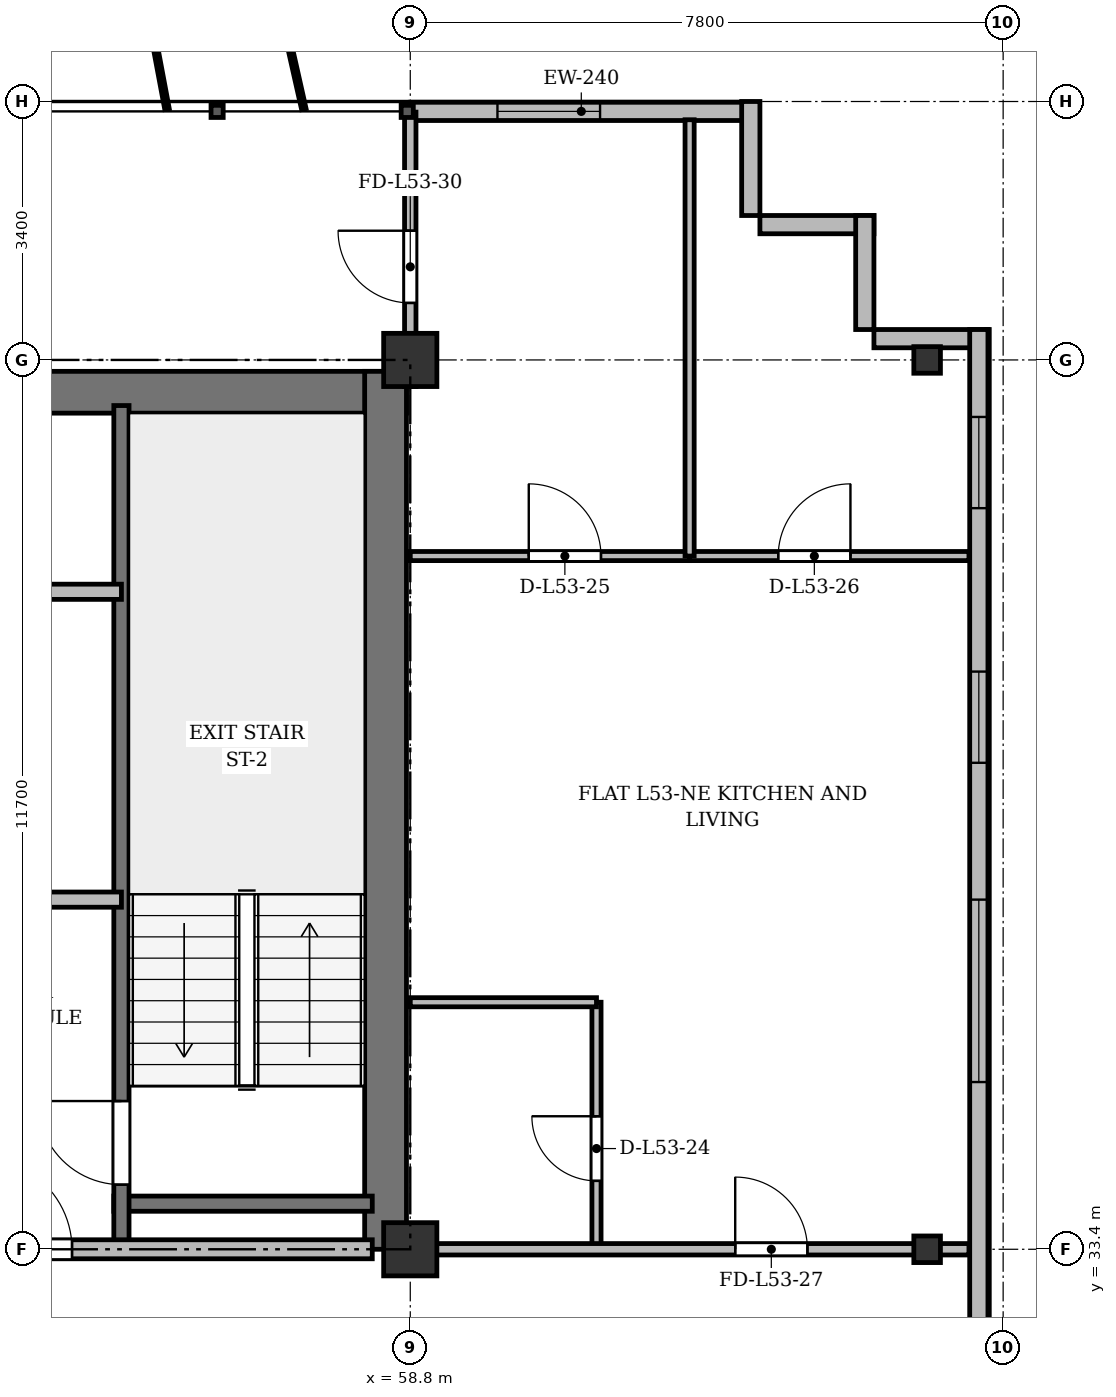
"""IFC4 building model, lengths in metres.
Left out: names, types, materials, properties, quantities, classifications, styles, units other than length and angle.
Written with IfcOpenShell. Run it as: python <this file> out.ifc"""

import sys

from ifc_helpers import new_model, si_unit, direction, frame, frame_2d, origin, origin_2d, place, context, subcontext, project, spatial, rectangle, i_section, extrude, source, transform, mapped, element, fill, save


model = new_model("IFC4")
c1 = context("Model", 3, precision=1e-05, world=origin(), true_north=direction((0.0, 1.0)))
c2 = subcontext(c1, "Body", "Model", "MODEL_VIEW")
j1 = project(units=[si_unit("LENGTHUNIT", "METRE"), si_unit("PLANEANGLEUNIT", "RADIAN")], contexts=[c1])
p1 = place(None, origin())
s1 = spatial("IfcSite", under=j1, at=p1, CompositionType="ELEMENT")
p2 = place(p1, origin())
s2 = spatial("IfcBuilding", under=s1, at=p2, CompositionType="ELEMENT")
p3 = place(p2, frame((0.0, 0.0, 204.9)))
s3 = spatial("IfcBuildingStorey", under=s2, at=p3, CompositionType="ELEMENT", Elevation=204.9)
m1 = source(origin(), c2, "Body", "SweptSolid", [
    extrude(rectangle(XDim=0.7, YDim=0.7, at=origin_2d()), origin(), (0.0, 0.0, 1.0), 3.6),
])
for number, where, z_axis, x_axis in (
    (1, (58.8, 33.4, 0.0), (0.0, 0.0, 1.0), (1.0, 0.0, 0.0)),
    (2, (58.8, 45.1, 0.0), (0.0, 0.0, 1.0), (1.0, 0.0, 0.0)),
):
    element("IfcColumn", number, at=place(p3, frame(where, z_axis=z_axis, x_axis=x_axis)), inside=s3, PredefinedType="COLUMN", context=c2, shape_type="MappedRepresentation", body=[
        mapped(m1, transform((0.0, 0.0, 0.0), x_axis=(1.0, 0.0, 0.0), y_axis=(0.0, 1.0, 0.0), z_axis=(0.0, 0.0, 1.0), scale=1.0)),
    ])
m2 = source(origin(), c2, "Body", "SweptSolid", [
    extrude(i_section(OverallWidth=0.35, OverallDepth=0.35, WebThickness=0.018, FlangeThickness=0.028, at=origin_2d()), origin(), (0.0, 0.0, 1.0), 3.6),
])
for number, where, z_axis, x_axis in (
    (3, (65.6, 33.4, 0.0), (0.0, 0.0, 1.0), (1.0, 0.0, 0.0)),
    (4, (65.6, 45.1, 0.0), (0.0, 0.0, 1.0), (1.0, 0.0, 0.0)),
):
    element("IfcColumn", number, at=place(p3, frame(where, z_axis=z_axis, x_axis=x_axis)), inside=s3, PredefinedType="COLUMN", context=c2, shape_type="MappedRepresentation", body=[
        mapped(m2, transform((0.0, 0.0, 0.0), x_axis=(1.0, 0.0, 0.0), y_axis=(0.0, 1.0, 0.0), z_axis=(0.0, 0.0, 1.0), scale=1.0)),
    ])
p4 = place(p3, frame((58.8, 48.37, 0.0), z_axis=(0.0, 0.0, 1.0), x_axis=(1.0, 0.0, 0.0)))
e5 = element("IfcWall", 5, at=p4, inside=s3, PredefinedType="SOLIDWALL", context=c2, shape_type="SweptSolid", body=[
    extrude(rectangle(XDim=4.5, YDim=0.24, at=frame_2d((2.25, 0.0))), origin(), (0.0, 0.0, 1.0), 3.36),
])
p5 = place(p4, frame((1.147, 0.0, 0.9)))
e6 = element("IfcOpeningElement", 6, at=p5, cuts=e5, PredefinedType="OPENING", context=c2, shape_type="SweptSolid", body=[
    extrude(rectangle(XDim=1.35, YDim=1.5, at=frame_2d((0.675, 0.75))), frame((0.0, 0.13, 0.0), z_axis=(0.0, -1.0, 0.0), x_axis=(1.0, 0.0, 0.0)), (0.0, 0.0, 1.0), 0.26),
])
for number, where, z_axis, x_axis in (
    (7, (63.28, 48.5, 0.0), (0.0, 0.0, 1.0), (0.0, -1.0, 0.0)),
    (8, (63.4, 46.88, 0.0), (0.0, 0.0, 1.0), (1.0, 0.0, 0.0)),
    (9, (64.78, 47.0, 0.0), (0.0, 0.0, 1.0), (0.0, -1.0, 0.0)),
    (10, (64.9, 45.38, 0.0), (0.0, 0.0, 1.0), (1.0, 0.0, 0.0)),
):
    element("IfcWall", number, at=place(p3, frame(where, z_axis=z_axis, x_axis=x_axis)), inside=s3, PredefinedType="SOLIDWALL", context=c2, shape_type="SweptSolid", body=[
        extrude(rectangle(XDim=1.5, YDim=0.24, at=frame_2d((0.75, 0.0))), origin(), (0.0, 0.0, 1.0), 3.36),
    ])
p6 = place(p3, frame((66.28, 45.5, 0.0), z_axis=(0.0, 0.0, 1.0), x_axis=(0.0, -1.0, 0.0)))
e11 = element("IfcWall", 11, at=p6, inside=s3, PredefinedType="SOLIDWALL", context=c2, shape_type="SweptSolid", body=[
    extrude(rectangle(XDim=39.1, YDim=0.24, at=frame_2d((19.55, 0.0))), origin(), (0.0, 0.0, 1.0), 3.36),
])
p7 = place(p6, frame((36.45, 0.0, 0.92)))
e12 = element("IfcOpeningElement", 12, at=p7, cuts=e11, PredefinedType="OPENING", context=c2, shape_type="SweptSolid", body=[
    extrude(rectangle(XDim=1.2, YDim=1.65, at=frame_2d((0.6, 0.825))), frame((0.0, 0.13, 0.0), z_axis=(0.0, -1.0, 0.0), x_axis=(1.0, 0.0, 0.0)), (0.0, 0.0, 1.0), 0.26),
])
p8 = place(p6, frame((32.9, 0.0, 0.92)))
e13 = element("IfcOpeningElement", 13, at=p8, cuts=e11, PredefinedType="OPENING", context=c2, shape_type="SweptSolid", body=[
    extrude(rectangle(XDim=2.4, YDim=2.1, at=frame_2d((1.2, 1.05))), frame((0.0, 0.13, 0.0), z_axis=(0.0, -1.0, 0.0), x_axis=(1.0, 0.0, 0.0)), (0.0, 0.0, 1.0), 0.26),
])
p9 = place(p6, frame((28.7, 0.0, 0.92)))
e14 = element("IfcOpeningElement", 14, at=p9, cuts=e11, PredefinedType="OPENING", context=c2, shape_type="SweptSolid", body=[
    extrude(rectangle(XDim=2.4, YDim=2.1, at=frame_2d((1.2, 1.05))), frame((0.0, 0.13, 0.0), z_axis=(0.0, -1.0, 0.0), x_axis=(1.0, 0.0, 0.0)), (0.0, 0.0, 1.0), 0.26),
])
p10 = place(p6, frame((21.5, 0.0, 0.92)))
e15 = element("IfcOpeningElement", 15, at=p10, cuts=e11, PredefinedType="OPENING", context=c2, shape_type="SweptSolid", body=[
    extrude(rectangle(XDim=2.4, YDim=2.1, at=frame_2d((1.2, 1.05))), frame((0.0, 0.13, 0.0), z_axis=(0.0, -1.0, 0.0), x_axis=(1.0, 0.0, 0.0)), (0.0, 0.0, 1.0), 0.26),
])
p11 = place(p6, frame((7.5, 0.0, 0.92)))
e16 = element("IfcOpeningElement", 16, at=p11, cuts=e11, PredefinedType="OPENING", context=c2, shape_type="SweptSolid", body=[
    extrude(rectangle(XDim=2.4, YDim=2.1, at=frame_2d((1.2, 1.05))), frame((0.0, 0.13, 0.0), z_axis=(0.0, -1.0, 0.0), x_axis=(1.0, 0.0, 0.0)), (0.0, 0.0, 1.0), 0.26),
])
p12 = place(p6, frame((4.5, 0.0, 0.92)))
e17 = element("IfcOpeningElement", 17, at=p12, cuts=e11, PredefinedType="OPENING", context=c2, shape_type="SweptSolid", body=[
    extrude(rectangle(XDim=1.2, YDim=1.65, at=frame_2d((0.6, 0.825))), frame((0.0, 0.13, 0.0), z_axis=(0.0, -1.0, 0.0), x_axis=(1.0, 0.0, 0.0)), (0.0, 0.0, 1.0), 0.26),
])
p13 = place(p6, frame((1.15, 0.0, 0.92)))
e18 = element("IfcOpeningElement", 18, at=p13, cuts=e11, PredefinedType="OPENING", context=c2, shape_type="SweptSolid", body=[
    extrude(rectangle(XDim=1.2, YDim=1.65, at=frame_2d((0.6, 0.825))), frame((0.0, 0.13, 0.0), z_axis=(0.0, -1.0, 0.0), x_axis=(1.0, 0.0, 0.0)), (0.0, 0.0, 1.0), 0.26),
])
p14 = place(p3, frame((15.65, 44.675, 0.0), z_axis=(0.0, 0.0, 1.0), x_axis=(1.0, 0.0, 0.0)))
e19 = element("IfcWall", 19, at=p14, inside=s3, PredefinedType="SHEAR", context=c2, shape_type="SweptSolid", body=[
    extrude(rectangle(XDim=43.1, YDim=0.55, at=frame_2d((21.55, 0.0))), origin(), (0.0, 0.0, 1.0), 3.36),
])
p15 = place(p3, frame((58.475, 33.4, 0.0), z_axis=(0.0, 0.0, 1.0), x_axis=(0.0, 1.0, 0.0)))
e20 = element("IfcWall", 20, at=p15, inside=s3, PredefinedType="SHEAR", context=c2, shape_type="SweptSolid", body=[
    extrude(rectangle(XDim=11.55, YDim=0.55, at=frame_2d((5.775, 0.0))), origin(), (0.0, 0.0, 1.0), 3.36),
])
p16 = place(p3, frame((54.9, 34.0, 0.0), z_axis=(0.0, 0.0, 1.0), x_axis=(1.0, 0.0, 0.0)))
e21 = element("IfcWall", 21, at=p16, inside=s3, PredefinedType="SHEAR", context=c2, shape_type="SweptSolid", body=[
    extrude(rectangle(XDim=3.4, YDim=0.2, at=frame_2d((1.7, 0.0))), origin(), (0.0, 0.0, 1.0), 3.36),
])
p17 = place(p3, frame((55.0, 33.4, 0.0), z_axis=(0.0, 0.0, 1.0), x_axis=(0.0, 1.0, 0.0)))
e22 = element("IfcWall", 22, at=p17, inside=s3, PredefinedType="SHEAR", context=c2, shape_type="SweptSolid", body=[
    extrude(rectangle(XDim=11.1, YDim=0.2, at=frame_2d((5.55, 0.0))), origin(), (0.0, 0.0, 1.0), 3.36),
])
p18 = place(p17, frame((0.85, 0.0, 0.0)))
e23 = element("IfcOpeningElement", 23, at=p18, cuts=e22, PredefinedType="OPENING", context=c2, shape_type="SweptSolid", body=[
    extrude(rectangle(XDim=1.1, YDim=2.15, at=frame_2d((0.55, 1.075))), frame((0.0, 0.11, 0.0), z_axis=(0.0, -1.0, 0.0), x_axis=(1.0, 0.0, 0.0)), (0.0, 0.0, 1.0), 0.22),
])
p19 = place(p3, frame((47.15, 42.05, 0.0), z_axis=(0.0, 0.0, 1.0), x_axis=(1.0, 0.0, 0.0)))
e24 = element("IfcWall", 24, at=p19, inside=s3, PredefinedType="SOLIDWALL", context=c2, shape_type="SweptSolid", body=[
    extrude(rectangle(XDim=7.85, YDim=0.2, at=frame_2d((3.925, 0.0))), origin(), (0.0, 0.0, 1.0), 2.86),
])
p20 = place(p19, frame((0.75, 0.0, 0.0)))
e25 = element("IfcOpeningElement", 25, at=p20, cuts=e24, PredefinedType="OPENING", context=c2, shape_type="SweptSolid", body=[
    extrude(rectangle(XDim=0.9, YDim=2.1, at=frame_2d((0.45, 1.05))), frame((0.0, 0.11, 0.0), z_axis=(0.0, -1.0, 0.0), x_axis=(1.0, 0.0, 0.0)), (0.0, 0.0, 1.0), 0.22),
])
p21 = place(p19, frame((3.85, 0.0, 0.0)))
e26 = element("IfcOpeningElement", 26, at=p21, cuts=e24, PredefinedType="OPENING", context=c2, shape_type="SweptSolid", body=[
    extrude(rectangle(XDim=0.9, YDim=2.1, at=frame_2d((0.45, 1.05))), frame((0.0, 0.11, 0.0), z_axis=(0.0, -1.0, 0.0), x_axis=(1.0, 0.0, 0.0)), (0.0, 0.0, 1.0), 0.22),
])
p22 = place(p3, frame((52.45, 38.0, 0.0), z_axis=(0.0, 0.0, 1.0), x_axis=(1.0, 0.0, 0.0)))
e27 = element("IfcWall", 27, at=p22, inside=s3, PredefinedType="PARTITIONING", context=c2, shape_type="SweptSolid", body=[
    extrude(rectangle(XDim=2.55, YDim=0.2, at=frame_2d((1.275, 0.0))), origin(), (0.0, 0.0, 1.0), 3.36),
])
p23 = place(p3, frame((47.15, 33.4, 0.0), z_axis=(0.0, 0.0, 1.0), x_axis=(1.0, 0.0, 0.0)))
e28 = element("IfcWall", 28, at=p23, inside=s3, PredefinedType="PARTITIONING", context=c2, shape_type="SweptSolid", body=[
    extrude(rectangle(XDim=11.15, YDim=0.25, at=frame_2d((5.575, 0.0))), origin(), (0.0, 0.0, 1.0), 2.91),
])
p24 = place(p23, frame((0.7, 0.0, 0.0)))
e29 = element("IfcOpeningElement", 29, at=p24, cuts=e28, PredefinedType="OPENING", context=c2, shape_type="SweptSolid", body=[
    extrude(rectangle(XDim=0.95, YDim=2.15, at=frame_2d((0.475, 1.075))), frame((0.0, 0.135, 0.0), z_axis=(0.0, -1.0, 0.0), x_axis=(1.0, 0.0, 0.0)), (0.0, 0.0, 1.0), 0.27),
])
p25 = place(p23, frame((6.0, 0.0, 0.0)))
e30 = element("IfcOpeningElement", 30, at=p25, cuts=e28, PredefinedType="OPENING", context=c2, shape_type="SweptSolid", body=[
    extrude(rectangle(XDim=1.2, YDim=2.15, at=frame_2d((0.6, 1.075))), frame((0.0, 0.135, 0.0), z_axis=(0.0, -1.0, 0.0), x_axis=(1.0, 0.0, 0.0)), (0.0, 0.0, 1.0), 0.27),
])
p26 = place(p3, frame((61.25, 33.4, 0.0), z_axis=(0.0, 0.0, 1.0), x_axis=(0.0, 1.0, 0.0)))
e31 = element("IfcWall", 31, at=p26, inside=s3, PredefinedType="PARTITIONING", context=c2, shape_type="SweptSolid", body=[
    extrude(rectangle(XDim=3.25, YDim=0.12, at=frame_2d((1.625, 0.0))), origin(), (0.0, 0.0, 1.0), 2.91),
])
p27 = place(p26, frame((0.9, 0.0, 0.0)))
e32 = element("IfcOpeningElement", 32, at=p27, cuts=e31, PredefinedType="OPENING", context=c2, shape_type="SweptSolid", body=[
    extrude(rectangle(XDim=0.85, YDim=2.1, at=frame_2d((0.425, 1.05))), frame((0.0, 0.07, 0.0), z_axis=(0.0, -1.0, 0.0), x_axis=(1.0, 0.0, 0.0)), (0.0, 0.0, 1.0), 0.14),
])
p28 = place(p3, frame((58.8, 36.65, 0.0), z_axis=(0.0, 0.0, 1.0), x_axis=(1.0, 0.0, 0.0)))
e33 = element("IfcWall", 33, at=p28, inside=s3, PredefinedType="PARTITIONING", context=c2, shape_type="SweptSolid", body=[
    extrude(rectangle(XDim=2.45, YDim=0.12, at=frame_2d((1.225, 0.0))), origin(), (0.0, 0.0, 1.0), 2.86),
])
p29 = place(p3, frame((58.8, 42.52, 0.0), z_axis=(0.0, 0.0, 1.0), x_axis=(1.0, 0.0, 0.0)))
e34 = element("IfcWall", 34, at=p29, inside=s3, PredefinedType="PARTITIONING", context=c2, shape_type="SweptSolid", body=[
    extrude(rectangle(XDim=3.675, YDim=0.12, at=frame_2d((1.837, 0.0))), origin(), (0.0, 0.0, 1.0), 2.86),
])
p30 = place(p29, frame((1.559, 0.0, 0.0)))
e35 = element("IfcOpeningElement", 35, at=p30, cuts=e34, PredefinedType="OPENING", context=c2, shape_type="SweptSolid", body=[
    extrude(rectangle(XDim=0.95, YDim=2.15, at=frame_2d((0.475, 1.075))), frame((0.0, 0.07, 0.0), z_axis=(0.0, -1.0, 0.0), x_axis=(1.0, 0.0, 0.0)), (0.0, 0.0, 1.0), 0.14),
])
p31 = place(p3, frame((62.475, 42.52, 0.0), z_axis=(0.0, 0.0, 1.0), x_axis=(1.0, 0.0, 0.0)))
e36 = element("IfcWall", 36, at=p31, inside=s3, PredefinedType="PARTITIONING", context=c2, shape_type="SweptSolid", body=[
    extrude(rectangle(XDim=3.675, YDim=0.12, at=frame_2d((1.837, 0.0))), origin(), (0.0, 0.0, 1.0), 2.86),
])
p32 = place(p31, frame((1.166, 0.0, 0.0)))
e37 = element("IfcOpeningElement", 37, at=p32, cuts=e36, PredefinedType="OPENING", context=c2, shape_type="SweptSolid", body=[
    extrude(rectangle(XDim=0.95, YDim=2.15, at=frame_2d((0.475, 1.075))), frame((0.0, 0.07, 0.0), z_axis=(0.0, -1.0, 0.0), x_axis=(1.0, 0.0, 0.0)), (0.0, 0.0, 1.0), 0.14),
])
p33 = place(p3, frame((62.475, 42.52, 0.0), z_axis=(0.0, 0.0, 1.0), x_axis=(0.0, 1.0, 0.0)))
e38 = element("IfcWall", 38, at=p33, inside=s3, PredefinedType="PARTITIONING", context=c2, shape_type="SweptSolid", body=[
    extrude(rectangle(XDim=5.74, YDim=0.12, at=frame_2d((2.87, 0.0))), origin(), (0.0, 0.0, 1.0), 2.91),
])
p34 = place(p3, frame((58.8, 33.4, 0.0), z_axis=(0.0, 0.0, 1.0), x_axis=(1.0, 0.0, 0.0)))
e39 = element("IfcWall", 39, at=p34, inside=s3, PredefinedType="PARTITIONING", context=c2, shape_type="SweptSolid", body=[
    extrude(rectangle(XDim=7.35, YDim=0.15, at=frame_2d((3.675, 0.0))), origin(), (0.0, 0.0, 1.0), 2.91),
])
p35 = place(p34, frame((4.275, 0.0, 0.0)))
e40 = element("IfcOpeningElement", 40, at=p35, cuts=e39, PredefinedType="OPENING", context=c2, shape_type="SweptSolid", body=[
    extrude(rectangle(XDim=0.95, YDim=2.15, at=frame_2d((0.475, 1.075))), frame((0.0, 0.085, 0.0), z_axis=(0.0, -1.0, 0.0), x_axis=(1.0, 0.0, 0.0)), (0.0, 0.0, 1.0), 0.17),
])
p36 = place(p3, frame((58.8, 44.75, 0.0), z_axis=(0.0, 0.0, 1.0), x_axis=(0.0, 1.0, 0.0)))
e41 = element("IfcWall", 41, at=p36, inside=s3, PredefinedType="PARTITIONING", context=c2, shape_type="SweptSolid", body=[
    extrude(rectangle(XDim=3.61, YDim=0.15, at=frame_2d((1.805, 0.0))), origin(), (0.0, 0.0, 1.0), 2.86),
])
p37 = place(p36, frame((1.1, 0.0, 0.0)))
e42 = element("IfcOpeningElement", 42, at=p37, cuts=e41, PredefinedType="OPENING", context=c2, shape_type="SweptSolid", body=[
    extrude(rectangle(XDim=0.95, YDim=2.15, at=frame_2d((0.475, 1.075))), frame((0.0, 0.085, 0.0), z_axis=(0.0, -1.0, 0.0), x_axis=(1.0, 0.0, 0.0)), (0.0, 0.0, 1.0), 0.17),
])
m3 = source(origin(), c2, "Body", "SweptSolid", [
    extrude(rectangle(XDim=1.35, YDim=1.5, at=frame_2d((0.675, 0.75))), frame((0.0, 0.03, 0.0), z_axis=(0.0, -1.0, 0.0), x_axis=(1.0, 0.0, 0.0)), (0.0, 0.0, 1.0), 0.06),
])
p38 = place(p5, origin())
e43 = element("IfcWindow", 43, at=p38, inside=s3, PartitioningType="SINGLE_PANEL", PredefinedType="WINDOW", context=c2, shape_type="MappedRepresentation", body=[
    mapped(m3, transform((0.0, 0.0, 0.0), x_axis=(1.0, 0.0, 0.0), y_axis=(0.0, 1.0, 0.0), z_axis=(0.0, 0.0, 1.0), scale=1.0)),
])
fill(e6, e43)
m4 = source(origin(), c2, "Body", "SweptSolid", [
    extrude(rectangle(XDim=2.4, YDim=2.1, at=frame_2d((1.2, 1.05))), frame((0.0, 0.03, 0.0), z_axis=(0.0, -1.0, 0.0), x_axis=(1.0, 0.0, 0.0)), (0.0, 0.0, 1.0), 0.06),
])
p39 = place(p11, origin())
e44 = element("IfcWindow", 44, at=p39, inside=s3, PartitioningType="SINGLE_PANEL", PredefinedType="WINDOW", context=c2, shape_type="MappedRepresentation", body=[
    mapped(m4, transform((0.0, 0.0, 0.0), x_axis=(1.0, 0.0, 0.0), y_axis=(0.0, 1.0, 0.0), z_axis=(0.0, 0.0, 1.0), scale=1.0)),
])
fill(e16, e44)
m5 = source(origin(), c2, "Body", "SweptSolid", [
    extrude(rectangle(XDim=1.2, YDim=1.65, at=frame_2d((0.6, 0.825))), frame((0.0, 0.03, 0.0), z_axis=(0.0, -1.0, 0.0), x_axis=(1.0, 0.0, 0.0)), (0.0, 0.0, 1.0), 0.06),
])
p40 = place(p12, origin())
e45 = element("IfcWindow", 45, at=p40, inside=s3, PartitioningType="SINGLE_PANEL", PredefinedType="WINDOW", context=c2, shape_type="MappedRepresentation", body=[
    mapped(m5, transform((0.0, 0.0, 0.0), x_axis=(1.0, 0.0, 0.0), y_axis=(0.0, 1.0, 0.0), z_axis=(0.0, 0.0, 1.0), scale=1.0)),
])
fill(e17, e45)
p41 = place(p13, origin())
e46 = element("IfcWindow", 46, at=p41, inside=s3, PartitioningType="SINGLE_PANEL", PredefinedType="WINDOW", context=c2, shape_type="MappedRepresentation", body=[
    mapped(m5, transform((0.0, 0.0, 0.0), x_axis=(1.0, 0.0, 0.0), y_axis=(0.0, 1.0, 0.0), z_axis=(0.0, 0.0, 1.0), scale=1.0)),
])
fill(e18, e46)
m6 = source(origin(), c2, "Body", "SweptSolid", [
    extrude(rectangle(XDim=1.1, YDim=2.15, at=frame_2d((0.55, 1.075))), frame((0.0, 0.025, 0.0), z_axis=(0.0, -1.0, 0.0), x_axis=(1.0, 0.0, 0.0)), (0.0, 0.0, 1.0), 0.05),
])
p42 = place(p18, origin())
e47 = element("IfcDoor", 47, at=p42, inside=s3, OperationType="SINGLE_SWING_RIGHT", PredefinedType="DOOR", context=c2, shape_type="MappedRepresentation", body=[
    mapped(m6, transform((0.0, 0.0, 0.0), x_axis=(1.0, 0.0, 0.0), y_axis=(0.0, 1.0, 0.0), z_axis=(0.0, 0.0, 1.0), scale=1.0)),
])
fill(e23, e47)
m7 = source(origin(), c2, "Body", "SweptSolid", [
    extrude(rectangle(XDim=1.2, YDim=2.15, at=frame_2d((0.6, 1.075))), frame((0.0, 0.025, 0.0), z_axis=(0.0, -1.0, 0.0), x_axis=(1.0, 0.0, 0.0)), (0.0, 0.0, 1.0), 0.05),
])
p43 = place(p25, origin())
e48 = element("IfcDoor", 48, at=p43, inside=s3, OperationType="SINGLE_SWING_LEFT", PredefinedType="DOOR", context=c2, shape_type="MappedRepresentation", body=[
    mapped(m7, transform((0.0, 0.0, 0.0), x_axis=(1.0, 0.0, 0.0), y_axis=(0.0, 1.0, 0.0), z_axis=(0.0, 0.0, 1.0), scale=1.0)),
])
fill(e30, e48)
m8 = source(origin(), c2, "Body", "SweptSolid", [
    extrude(rectangle(XDim=0.85, YDim=2.1, at=frame_2d((0.425, 1.05))), frame((0.0, 0.025, 0.0), z_axis=(0.0, -1.0, 0.0), x_axis=(1.0, 0.0, 0.0)), (0.0, 0.0, 1.0), 0.05),
])
p44 = place(p27, origin())
e49 = element("IfcDoor", 49, at=p44, inside=s3, OperationType="SINGLE_SWING_RIGHT", PredefinedType="DOOR", context=c2, shape_type="MappedRepresentation", body=[
    mapped(m8, transform((0.0, 0.0, 0.0), x_axis=(1.0, 0.0, 0.0), y_axis=(0.0, 1.0, 0.0), z_axis=(0.0, 0.0, 1.0), scale=1.0)),
])
fill(e32, e49)
m9 = source(origin(), c2, "Body", "SweptSolid", [
    extrude(rectangle(XDim=0.95, YDim=2.15, at=frame_2d((0.475, 1.075))), frame((0.0, 0.025, 0.0), z_axis=(0.0, -1.0, 0.0), x_axis=(1.0, 0.0, 0.0)), (0.0, 0.0, 1.0), 0.05),
])
p45 = place(p30, origin())
e50 = element("IfcDoor", 50, at=p45, inside=s3, OperationType="SINGLE_SWING_LEFT", PredefinedType="DOOR", context=c2, shape_type="MappedRepresentation", body=[
    mapped(m9, transform((0.0, 0.0, 0.0), x_axis=(1.0, 0.0, 0.0), y_axis=(0.0, 1.0, 0.0), z_axis=(0.0, 0.0, 1.0), scale=1.0)),
])
fill(e35, e50)
p46 = place(p32, origin())
e51 = element("IfcDoor", 51, at=p46, inside=s3, OperationType="SINGLE_SWING_RIGHT", PredefinedType="DOOR", context=c2, shape_type="MappedRepresentation", body=[
    mapped(m9, transform((0.0, 0.0, 0.0), x_axis=(1.0, 0.0, 0.0), y_axis=(0.0, 1.0, 0.0), z_axis=(0.0, 0.0, 1.0), scale=1.0)),
])
fill(e37, e51)
p47 = place(p35, origin())
e52 = element("IfcDoor", 52, at=p47, inside=s3, OperationType="SINGLE_SWING_LEFT", PredefinedType="DOOR", context=c2, shape_type="MappedRepresentation", body=[
    mapped(m9, transform((0.0, 0.0, 0.0), x_axis=(1.0, 0.0, 0.0), y_axis=(0.0, 1.0, 0.0), z_axis=(0.0, 0.0, 1.0), scale=1.0)),
])
fill(e40, e52)
p48 = place(p37, origin())
e53 = element("IfcDoor", 53, at=p48, inside=s3, OperationType="SINGLE_SWING_RIGHT", PredefinedType="DOOR", context=c2, shape_type="MappedRepresentation", body=[
    mapped(m9, transform((0.0, 0.0, 0.0), x_axis=(1.0, 0.0, 0.0), y_axis=(0.0, 1.0, 0.0), z_axis=(0.0, 0.0, 1.0), scale=1.0)),
])
fill(e42, e53)
save(model, sys.argv[1])
